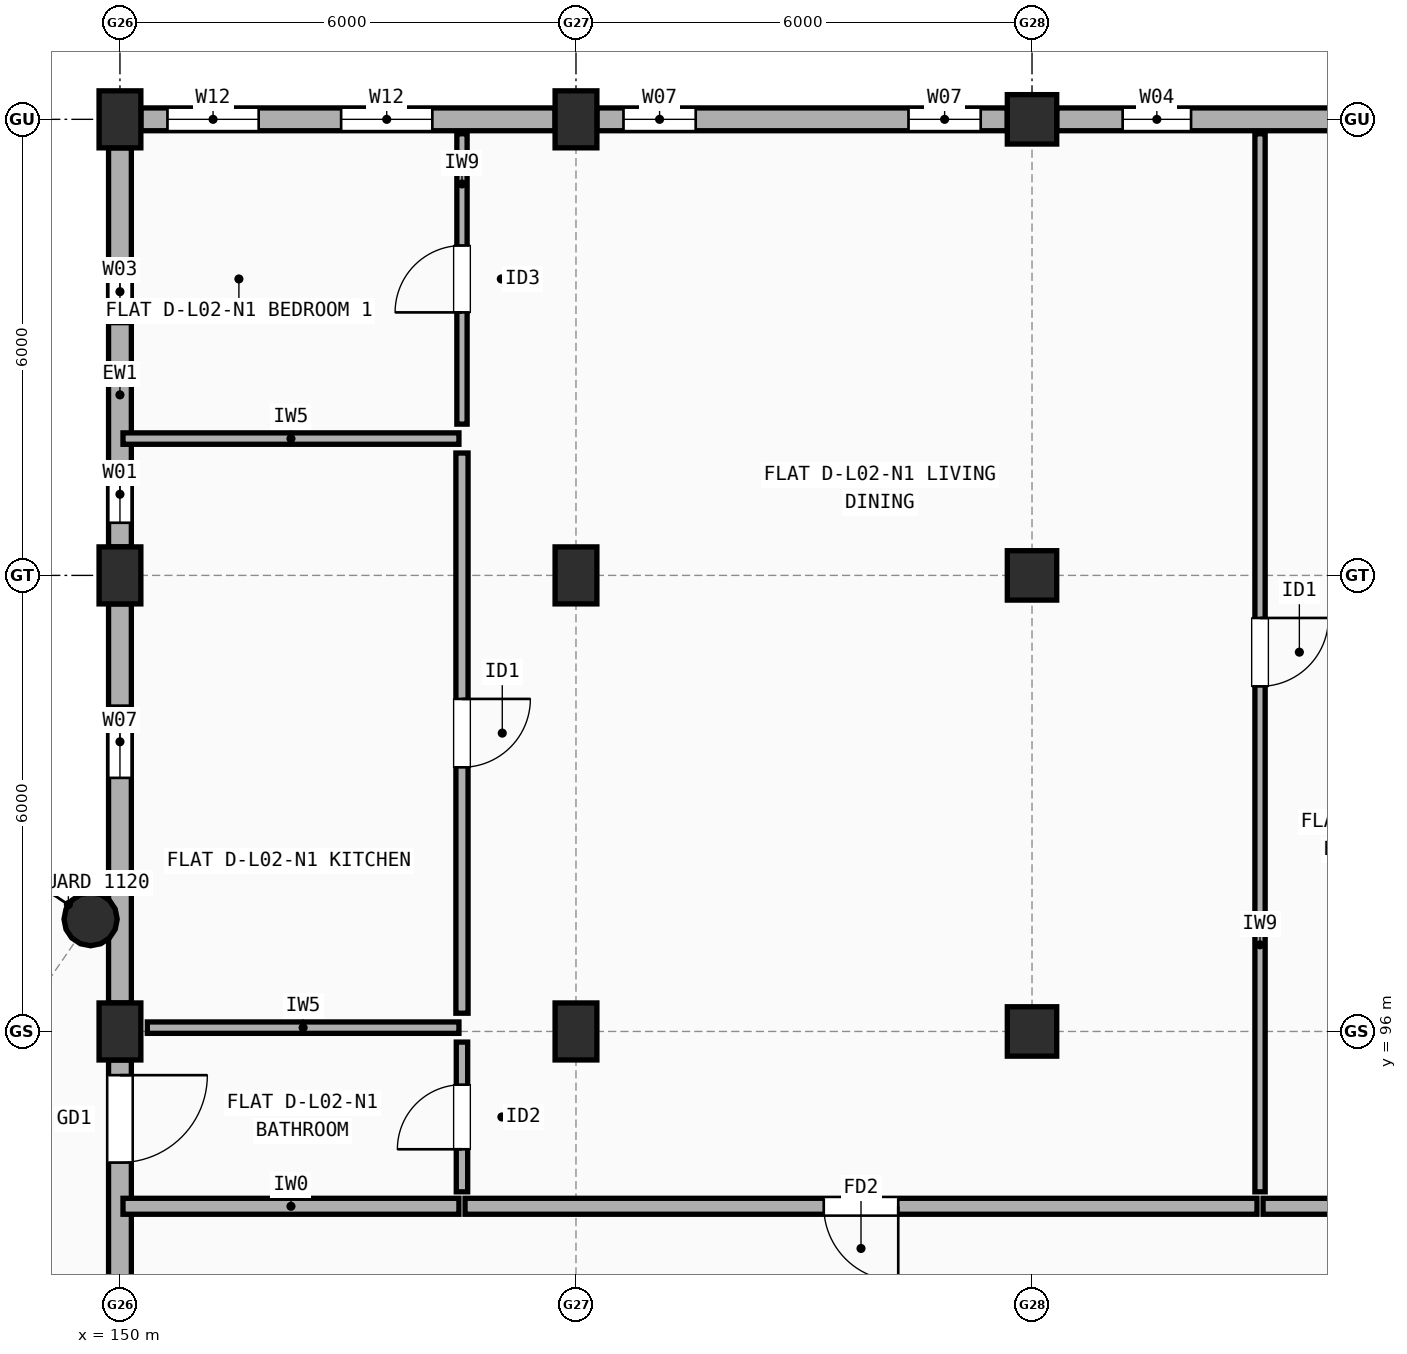
"""IFC4 building model, lengths in metres.
Left out: names, types, materials, properties, quantities, classifications, styles, units other than length and angle.
Written with IfcOpenShell. Run it as: python <this file> out.ifc"""

import sys

from ifc_helpers import new_model, si_unit, direction, frame, frame_2d, origin, origin_2d, place, context, subcontext, project, spatial, rectangle, circle, extrude, element, fill, save


model = new_model("IFC4")
c1 = context("Model", 3, precision=1e-05, world=origin(), true_north=direction((0.0, 1.0)))
c2 = subcontext(c1, "Body", "Model", "MODEL_VIEW")
j1 = project(units=[si_unit("LENGTHUNIT", "METRE"), si_unit("PLANEANGLEUNIT", "RADIAN")], contexts=[c1])
p1 = place(None, origin())
s1 = spatial("IfcSite", under=j1, at=p1, CompositionType="ELEMENT")
p2 = place(p1, origin())
s2 = spatial("IfcBuilding", under=s1, at=p2, CompositionType="ELEMENT")
p3 = place(p2, frame((0.0, 0.0, 7.7)))
s3 = spatial("IfcBuildingStorey", under=s2, at=p3, CompositionType="ELEMENT", Elevation=7.7)
for number, where, z_axis, x_axis in (
    (1, (150.0, 96.0, 0.0), (0.0, 0.0, 1.0), (1.0, 0.0, 0.0)),
    (2, (150.0, 102.0, 0.0), (0.0, 0.0, 1.0), (1.0, 0.0, 0.0)),
    (3, (150.0, 108.0, 0.0), (0.0, 0.0, 1.0), (1.0, 0.0, 0.0)),
    (4, (156.0, 96.0, 0.0), (0.0, 0.0, 1.0), (1.0, 0.0, 0.0)),
    (5, (156.0, 102.0, 0.0), (0.0, 0.0, 1.0), (1.0, 0.0, 0.0)),
    (6, (156.0, 108.0, 0.0), (0.0, 0.0, 1.0), (1.0, 0.0, 0.0)),
):
    element("IfcColumn", number, at=place(p3, frame(where, z_axis=z_axis, x_axis=x_axis)), inside=s3, PredefinedType="COLUMN", context=c2, shape_type="SweptSolid", body=[
        extrude(rectangle(XDim=0.55, YDim=0.75, at=origin_2d()), origin(), (0.0, 0.0, 1.0), 2.955),
    ])
for number, where, z_axis, x_axis in (
    (7, (162.0, 96.0, 0.0), (0.0, 0.0, 1.0), (1.0, 0.0, 0.0)),
    (8, (162.0, 102.0, 0.0), (0.0, 0.0, 1.0), (1.0, 0.0, 0.0)),
    (9, (162.0, 108.0, 0.0), (0.0, 0.0, 1.0), (1.0, 0.0, 0.0)),
):
    element("IfcColumn", number, at=place(p3, frame(where, z_axis=z_axis, x_axis=x_axis)), inside=s3, PredefinedType="COLUMN", context=c2, shape_type="SweptSolid", body=[
        extrude(rectangle(XDim=0.65, YDim=0.65, at=origin_2d()), origin(), (0.0, 0.0, 1.0), 2.955),
    ])
p4 = place(p3, frame((149.614, 97.477, 0.0), z_axis=(0.0, 0.0, 1.0), x_axis=(1.0, 0.0, 0.0)))
e10 = element("IfcColumn", 10, at=p4, inside=s3, PredefinedType="COLUMN", context=c2, shape_type="SweptSolid", body=[
    extrude(circle(Radius=0.35, at=origin_2d()), origin(), (0.0, 0.0, 1.0), 2.948),
])
p5 = place(p3, frame((167.675, 108.0, 0.0), z_axis=(0.0, 0.0, 1.0), x_axis=(-1.0, 0.0, 0.0)))
e11 = element("IfcWall", 11, at=p5, inside=s3, PredefinedType="STANDARD", context=c2, shape_type="SweptSolid", body=[
    extrude(rectangle(XDim=5.35, YDim=0.3, at=frame_2d((2.675, 0.0))), origin(), (0.0, 0.0, 1.0), 2.437),
])
p6 = place(p5, frame((0.893, 0.0, 0.9)))
e12 = element("IfcOpeningElement", 12, at=p6, cuts=e11, PredefinedType="OPENING", context=c2, shape_type="SweptSolid", body=[
    extrude(rectangle(XDim=0.85, YDim=1.25, at=frame_2d((0.425, 0.625))), frame((0.0, 0.16, 0.0), z_axis=(0.0, -1.0, 0.0), x_axis=(1.0, 0.0, 0.0)), (0.0, 0.0, 1.0), 0.32),
])
p7 = place(p5, frame((3.583, 0.0, 0.9)))
e13 = element("IfcOpeningElement", 13, at=p7, cuts=e11, PredefinedType="OPENING", context=c2, shape_type="SweptSolid", body=[
    extrude(rectangle(XDim=0.9, YDim=1.3, at=frame_2d((0.45, 0.65))), frame((0.0, 0.16, 0.0), z_axis=(0.0, -1.0, 0.0), x_axis=(1.0, 0.0, 0.0)), (0.0, 0.0, 1.0), 0.32),
])
p8 = place(p3, frame((161.675, 108.0, 0.0), z_axis=(0.0, 0.0, 1.0), x_axis=(-1.0, 0.0, 0.0)))
e14 = element("IfcWall", 14, at=p8, inside=s3, PredefinedType="STANDARD", context=c2, shape_type="SweptSolid", body=[
    extrude(rectangle(XDim=5.4, YDim=0.3, at=frame_2d((2.7, 0.0))), origin(), (0.0, 0.0, 1.0), 2.437),
])
p9 = place(p8, frame((0.35, 0.0, 0.9)))
e15 = element("IfcOpeningElement", 15, at=p9, cuts=e14, PredefinedType="OPENING", context=c2, shape_type="SweptSolid", body=[
    extrude(rectangle(XDim=0.95, YDim=1.35, at=frame_2d((0.475, 0.675))), frame((0.0, 0.16, 0.0), z_axis=(0.0, -1.0, 0.0), x_axis=(1.0, 0.0, 0.0)), (0.0, 0.0, 1.0), 0.32),
])
p10 = place(p8, frame((4.1, 0.0, 0.9)))
e16 = element("IfcOpeningElement", 16, at=p10, cuts=e14, PredefinedType="OPENING", context=c2, shape_type="SweptSolid", body=[
    extrude(rectangle(XDim=0.95, YDim=1.35, at=frame_2d((0.475, 0.675))), frame((0.0, 0.16, 0.0), z_axis=(0.0, -1.0, 0.0), x_axis=(1.0, 0.0, 0.0)), (0.0, 0.0, 1.0), 0.32),
])
p11 = place(p3, frame((155.725, 108.0, 0.0), z_axis=(0.0, 0.0, 1.0), x_axis=(-1.0, 0.0, 0.0)))
e17 = element("IfcWall", 17, at=p11, inside=s3, PredefinedType="STANDARD", context=c2, shape_type="SweptSolid", body=[
    extrude(rectangle(XDim=5.45, YDim=0.3, at=frame_2d((2.725, 0.0))), origin(), (0.0, 0.0, 1.0), 2.437),
])
p12 = place(p11, frame((1.615, 0.0, 0.9)))
e18 = element("IfcOpeningElement", 18, at=p12, cuts=e17, PredefinedType="OPENING", context=c2, shape_type="SweptSolid", body=[
    extrude(rectangle(XDim=1.2, YDim=1.35, at=frame_2d((0.6, 0.675))), frame((0.0, 0.16, 0.0), z_axis=(0.0, -1.0, 0.0), x_axis=(1.0, 0.0, 0.0)), (0.0, 0.0, 1.0), 0.32),
])
p13 = place(p11, frame((3.9, 0.0, 0.9)))
e19 = element("IfcOpeningElement", 19, at=p13, cuts=e17, PredefinedType="OPENING", context=c2, shape_type="SweptSolid", body=[
    extrude(rectangle(XDim=1.2, YDim=1.35, at=frame_2d((0.6, 0.675))), frame((0.0, 0.16, 0.0), z_axis=(0.0, -1.0, 0.0), x_axis=(1.0, 0.0, 0.0)), (0.0, 0.0, 1.0), 0.32),
])
p14 = place(p3, frame((150.0, 107.625, 0.0), z_axis=(0.0, 0.0, 1.0), x_axis=(0.0, -1.0, 0.0)))
e20 = element("IfcWall", 20, at=p14, inside=s3, PredefinedType="STANDARD", context=c2, shape_type="SweptSolid", body=[
    extrude(rectangle(XDim=5.25, YDim=0.3, at=frame_2d((2.625, 0.0))), origin(), (0.0, 0.0, 1.0), 2.437),
])
p15 = place(p14, frame((1.468, 0.0, 0.9)))
e21 = element("IfcOpeningElement", 21, at=p15, cuts=e20, PredefinedType="OPENING", context=c2, shape_type="SweptSolid", body=[
    extrude(rectangle(XDim=0.85, YDim=1.25, at=frame_2d((0.425, 0.625))), frame((0.0, 0.16, 0.0), z_axis=(0.0, -1.0, 0.0), x_axis=(1.0, 0.0, 0.0)), (0.0, 0.0, 1.0), 0.32),
])
p16 = place(p14, frame((4.183, 0.0, 0.9)))
e22 = element("IfcOpeningElement", 22, at=p16, cuts=e20, PredefinedType="OPENING", context=c2, shape_type="SweptSolid", body=[
    extrude(rectangle(XDim=0.75, YDim=1.15, at=frame_2d((0.375, 0.575))), frame((0.0, 0.16, 0.0), z_axis=(0.0, -1.0, 0.0), x_axis=(1.0, 0.0, 0.0)), (0.0, 0.0, 1.0), 0.32),
])
p17 = place(p3, frame((150.0, 101.625, 0.0), z_axis=(0.0, 0.0, 1.0), x_axis=(0.0, -1.0, 0.0)))
e23 = element("IfcWall", 23, at=p17, inside=s3, PredefinedType="STANDARD", context=c2, shape_type="SweptSolid", body=[
    extrude(rectangle(XDim=5.25, YDim=0.3, at=frame_2d((2.625, 0.0))), origin(), (0.0, 0.0, 1.0), 2.437),
])
p18 = place(p17, frame((1.339, 0.0, 0.9)))
e24 = element("IfcOpeningElement", 24, at=p18, cuts=e23, PredefinedType="OPENING", context=c2, shape_type="SweptSolid", body=[
    extrude(rectangle(XDim=0.95, YDim=1.35, at=frame_2d((0.475, 0.675))), frame((0.0, 0.16, 0.0), z_axis=(0.0, -1.0, 0.0), x_axis=(1.0, 0.0, 0.0)), (0.0, 0.0, 1.0), 0.32),
])
p19 = place(p3, frame((150.0, 95.625, 0.0), z_axis=(0.0, 0.0, 1.0), x_axis=(0.0, -1.0, 0.0)))
e25 = element("IfcWall", 25, at=p19, inside=s3, PredefinedType="STANDARD", context=c2, shape_type="SweptSolid", body=[
    extrude(rectangle(XDim=5.25, YDim=0.3, at=frame_2d((2.625, 0.0))), origin(), (0.0, 0.0, 1.0), 2.437),
])
p20 = place(p19, frame((0.2, 0.0, 0.0)))
e26 = element("IfcOpeningElement", 26, at=p20, cuts=e25, PredefinedType="OPENING", context=c2, shape_type="SweptSolid", body=[
    extrude(rectangle(XDim=1.15, YDim=2.15, at=frame_2d((0.575, 1.075))), frame((0.0, 0.16, 0.0), z_axis=(0.0, -1.0, 0.0), x_axis=(1.0, 0.0, 0.0)), (0.0, 0.0, 1.0), 0.32),
])
p21 = place(p19, frame((3.083, 0.0, 0.9)))
e27 = element("IfcOpeningElement", 27, at=p21, cuts=e25, PredefinedType="OPENING", context=c2, shape_type="SweptSolid", body=[
    extrude(rectangle(XDim=1.05, YDim=1.35, at=frame_2d((0.525, 0.675))), frame((0.0, 0.16, 0.0), z_axis=(0.0, -1.0, 0.0), x_axis=(1.0, 0.0, 0.0)), (0.0, 0.0, 1.0), 0.32),
])
p22 = place(p3, frame((150.04, 93.7, 0.0), z_axis=(0.0, 0.0, 1.0), x_axis=(1.0, 0.0, 0.0)))
e28 = element("IfcWall", 28, at=p22, inside=s3, PredefinedType="SOLIDWALL", context=c2, shape_type="SweptSolid", body=[
    extrude(rectangle(XDim=4.42, YDim=0.21, at=frame_2d((2.21, 0.0))), origin(), (0.0, 0.0, 1.0), 2.437),
])
p23 = place(p3, frame((154.54, 93.7, 0.0), z_axis=(0.0, 0.0, 1.0), x_axis=(1.0, 0.0, 0.0)))
e29 = element("IfcWall", 29, at=p23, inside=s3, PredefinedType="SOLIDWALL", context=c2, shape_type="SweptSolid", body=[
    extrude(rectangle(XDim=10.42, YDim=0.21, at=frame_2d((5.21, 0.0))), origin(), (0.0, 0.0, 1.0), 2.437),
])
p24 = place(p23, frame((4.72, 0.0, 0.0)))
e30 = element("IfcOpeningElement", 30, at=p24, cuts=e29, PredefinedType="OPENING", context=c2, shape_type="SweptSolid", body=[
    extrude(rectangle(XDim=0.98, YDim=2.15, at=frame_2d((0.49, 1.075))), frame((0.0, 0.115, 0.0), z_axis=(0.0, -1.0, 0.0), x_axis=(1.0, 0.0, 0.0)), (0.0, 0.0, 1.0), 0.23),
])
p25 = place(p3, frame((154.5, 103.99, 0.0), z_axis=(0.0, 0.0, 1.0), x_axis=(0.0, 1.0, 0.0)))
e31 = element("IfcWall", 31, at=p25, inside=s3, PredefinedType="PARTITIONING", context=c2, shape_type="SweptSolid", body=[
    extrude(rectangle(XDim=3.82, YDim=0.135, at=frame_2d((1.91, 0.0))), origin(), (0.0, 0.0, 1.0), 2.955),
])
p26 = place(p25, frame((1.47, 0.0, 0.0)))
e32 = element("IfcOpeningElement", 32, at=p26, cuts=e31, PredefinedType="OPENING", context=c2, shape_type="SweptSolid", body=[
    extrude(rectangle(XDim=0.88, YDim=2.1, at=frame_2d((0.44, 1.05))), frame((0.0, 0.077, 0.0), z_axis=(0.0, -1.0, 0.0), x_axis=(1.0, 0.0, 0.0)), (0.0, 0.0, 1.0), 0.155),
])
p27 = place(p3, frame((154.5, 96.24, 0.0), z_axis=(0.0, 0.0, 1.0), x_axis=(0.0, 1.0, 0.0)))
e33 = element("IfcWall", 33, at=p27, inside=s3, PredefinedType="PLUMBINGWALL", context=c2, shape_type="SweptSolid", body=[
    extrude(rectangle(XDim=7.37, YDim=0.16, at=frame_2d((3.685, 0.0))), origin(), (0.0, 0.0, 1.0), 2.437),
])
p28 = place(p27, frame((3.235, 0.0, 0.0)))
e34 = element("IfcOpeningElement", 34, at=p28, cuts=e33, PredefinedType="OPENING", context=c2, shape_type="SweptSolid", body=[
    extrude(rectangle(XDim=0.9, YDim=2.1, at=frame_2d((0.45, 1.05))), frame((0.0, 0.09, 0.0), z_axis=(0.0, -1.0, 0.0), x_axis=(1.0, 0.0, 0.0)), (0.0, 0.0, 1.0), 0.18),
])
p29 = place(p3, frame((154.5, 93.89, 0.0), z_axis=(0.0, 0.0, 1.0), x_axis=(0.0, 1.0, 0.0)))
e35 = element("IfcWall", 35, at=p29, inside=s3, PredefinedType="PARTITIONING", context=c2, shape_type="SweptSolid", body=[
    extrude(rectangle(XDim=1.97, YDim=0.15, at=frame_2d((0.985, 0.0))), origin(), (0.0, 0.0, 1.0), 2.955),
])
p30 = place(p29, frame((0.56, 0.0, 0.0)))
e36 = element("IfcOpeningElement", 36, at=p30, cuts=e35, PredefinedType="OPENING", context=c2, shape_type="SweptSolid", body=[
    extrude(rectangle(XDim=0.85, YDim=2.1, at=frame_2d((0.425, 1.05))), frame((0.0, 0.085, 0.0), z_axis=(0.0, -1.0, 0.0), x_axis=(1.0, 0.0, 0.0)), (0.0, 0.0, 1.0), 0.17),
])
p31 = place(p3, frame((150.04, 103.8, 0.0), z_axis=(0.0, 0.0, 1.0), x_axis=(1.0, 0.0, 0.0)))
e37 = element("IfcWall", 37, at=p31, inside=s3, PredefinedType="PARTITIONING", context=c2, shape_type="SweptSolid", body=[
    extrude(rectangle(XDim=4.42, YDim=0.15, at=frame_2d((2.21, 0.0))), origin(), (0.0, 0.0, 1.0), 2.437),
])
p32 = place(p3, frame((150.36, 96.05, 0.0), z_axis=(0.0, 0.0, 1.0), x_axis=(1.0, 0.0, 0.0)))
e38 = element("IfcWall", 38, at=p32, inside=s3, PredefinedType="PARTITIONING", context=c2, shape_type="SweptSolid", body=[
    extrude(rectangle(XDim=4.1, YDim=0.15, at=frame_2d((2.05, 0.0))), origin(), (0.0, 0.0, 1.0), 2.387),
])
p33 = place(p3, frame((165.04, 93.7, 0.0), z_axis=(0.0, 0.0, 1.0), x_axis=(1.0, 0.0, 0.0)))
e39 = element("IfcWall", 39, at=p33, inside=s3, PredefinedType="SOLIDWALL", context=c2, shape_type="SweptSolid", body=[
    extrude(rectangle(XDim=2.92, YDim=0.21, at=frame_2d((1.46, 0.0))), origin(), (0.0, 0.0, 1.0), 2.508),
])
p34 = place(p3, frame((165.0, 93.89, 0.0), z_axis=(0.0, 0.0, 1.0), x_axis=(0.0, 1.0, 0.0)))
e40 = element("IfcWall", 40, at=p34, inside=s3, PredefinedType="PARTITIONING", context=c2, shape_type="SweptSolid", body=[
    extrude(rectangle(XDim=13.92, YDim=0.135, at=frame_2d((6.96, 0.0))), origin(), (0.0, 0.0, 1.0), 2.387),
])
p35 = place(p34, frame((6.65, 0.0, 0.0)))
e41 = element("IfcOpeningElement", 41, at=p35, cuts=e40, PredefinedType="OPENING", context=c2, shape_type="SweptSolid", body=[
    extrude(rectangle(XDim=0.9, YDim=2.1, at=frame_2d((0.45, 1.05))), frame((0.0, 0.077, 0.0), z_axis=(0.0, -1.0, 0.0), x_axis=(1.0, 0.0, 0.0)), (0.0, 0.0, 1.0), 0.155),
])
p36 = place(p7, origin())
e42 = element("IfcWindow", 42, at=p36, inside=s3, PartitioningType="SINGLE_PANEL", PredefinedType="WINDOW", context=c2, shape_type="SweptSolid", body=[
    extrude(rectangle(XDim=0.9, YDim=1.3, at=frame_2d((0.45, 0.65))), frame((0.0, 0.03, 0.0), z_axis=(0.0, -1.0, 0.0), x_axis=(1.0, 0.0, 0.0)), (0.0, 0.0, 1.0), 0.06),
])
fill(e13, e42)
p37 = place(p9, origin())
e43 = element("IfcWindow", 43, at=p37, inside=s3, PartitioningType="SINGLE_PANEL", PredefinedType="WINDOW", context=c2, shape_type="SweptSolid", body=[
    extrude(rectangle(XDim=0.95, YDim=1.35, at=frame_2d((0.475, 0.675))), frame((0.0, 0.03, 0.0), z_axis=(0.0, -1.0, 0.0), x_axis=(1.0, 0.0, 0.0)), (0.0, 0.0, 1.0), 0.06),
])
fill(e15, e43)
p38 = place(p10, origin())
e44 = element("IfcWindow", 44, at=p38, inside=s3, PartitioningType="SINGLE_PANEL", PredefinedType="WINDOW", context=c2, shape_type="SweptSolid", body=[
    extrude(rectangle(XDim=0.95, YDim=1.35, at=frame_2d((0.475, 0.675))), frame((0.0, 0.03, 0.0), z_axis=(0.0, -1.0, 0.0), x_axis=(1.0, 0.0, 0.0)), (0.0, 0.0, 1.0), 0.06),
])
fill(e16, e44)
p39 = place(p12, origin())
e45 = element("IfcWindow", 45, at=p39, inside=s3, PartitioningType="SINGLE_PANEL", PredefinedType="WINDOW", context=c2, shape_type="SweptSolid", body=[
    extrude(rectangle(XDim=1.2, YDim=1.35, at=frame_2d((0.6, 0.675))), frame((0.0, 0.03, 0.0), z_axis=(0.0, -1.0, 0.0), x_axis=(1.0, 0.0, 0.0)), (0.0, 0.0, 1.0), 0.06),
])
fill(e18, e45)
p40 = place(p13, origin())
e46 = element("IfcWindow", 46, at=p40, inside=s3, PartitioningType="SINGLE_PANEL", PredefinedType="WINDOW", context=c2, shape_type="SweptSolid", body=[
    extrude(rectangle(XDim=1.2, YDim=1.35, at=frame_2d((0.6, 0.675))), frame((0.0, 0.03, 0.0), z_axis=(0.0, -1.0, 0.0), x_axis=(1.0, 0.0, 0.0)), (0.0, 0.0, 1.0), 0.06),
])
fill(e19, e46)
p41 = place(p15, origin())
e47 = element("IfcWindow", 47, at=p41, inside=s3, PartitioningType="SINGLE_PANEL", PredefinedType="WINDOW", context=c2, shape_type="SweptSolid", body=[
    extrude(rectangle(XDim=0.85, YDim=1.25, at=frame_2d((0.425, 0.625))), frame((0.0, 0.03, 0.0), z_axis=(0.0, -1.0, 0.0), x_axis=(1.0, 0.0, 0.0)), (0.0, 0.0, 1.0), 0.06),
])
fill(e21, e47)
p42 = place(p16, origin())
e48 = element("IfcWindow", 48, at=p42, inside=s3, PartitioningType="SINGLE_PANEL", PredefinedType="WINDOW", context=c2, shape_type="SweptSolid", body=[
    extrude(rectangle(XDim=0.75, YDim=1.15, at=frame_2d((0.375, 0.575))), frame((0.0, 0.03, 0.0), z_axis=(0.0, -1.0, 0.0), x_axis=(1.0, 0.0, 0.0)), (0.0, 0.0, 1.0), 0.06),
])
fill(e22, e48)
p43 = place(p18, origin())
e49 = element("IfcWindow", 49, at=p43, inside=s3, PartitioningType="SINGLE_PANEL", PredefinedType="WINDOW", context=c2, shape_type="SweptSolid", body=[
    extrude(rectangle(XDim=0.95, YDim=1.35, at=frame_2d((0.475, 0.675))), frame((0.0, 0.03, 0.0), z_axis=(0.0, -1.0, 0.0), x_axis=(1.0, 0.0, 0.0)), (0.0, 0.0, 1.0), 0.06),
])
fill(e24, e49)
p44 = place(p20, frame((1.15, 0.0, 0.0), z_axis=(0.0, 0.0, 1.0), x_axis=(-1.0, 0.0, 0.0)))
e50 = element("IfcDoor", 50, at=p44, inside=s3, OperationType="SINGLE_SWING_LEFT", PredefinedType="DOOR", context=c2, shape_type="SweptSolid", body=[
    extrude(rectangle(XDim=1.15, YDim=2.15, at=frame_2d((0.575, 1.075))), frame((0.0, 0.025, 0.0), z_axis=(0.0, -1.0, 0.0), x_axis=(1.0, 0.0, 0.0)), (0.0, 0.0, 1.0), 0.05),
])
fill(e26, e50)
p45 = place(p24, origin())
e51 = element("IfcDoor", 51, at=p45, inside=s3, OperationType="SINGLE_SWING_RIGHT", PredefinedType="DOOR", context=c2, shape_type="SweptSolid", body=[
    extrude(rectangle(XDim=0.98, YDim=2.15, at=frame_2d((0.49, 1.075))), frame((0.0, 0.025, 0.0), z_axis=(0.0, -1.0, 0.0), x_axis=(1.0, 0.0, 0.0)), (0.0, 0.0, 1.0), 0.05),
])
fill(e30, e51)
p46 = place(p26, origin())
e52 = element("IfcDoor", 52, at=p46, inside=s3, OperationType="SINGLE_SWING_LEFT", PredefinedType="DOOR", context=c2, shape_type="SweptSolid", body=[
    extrude(rectangle(XDim=0.88, YDim=2.1, at=frame_2d((0.44, 1.05))), frame((0.0, 0.025, 0.0), z_axis=(0.0, -1.0, 0.0), x_axis=(1.0, 0.0, 0.0)), (0.0, 0.0, 1.0), 0.05),
])
fill(e32, e52)
p47 = place(p28, origin())
e53 = element("IfcDoor", 53, at=p47, inside=s3, OperationType="SINGLE_SWING_RIGHT", PredefinedType="DOOR", context=c2, shape_type="SweptSolid", body=[
    extrude(rectangle(XDim=0.9, YDim=2.1, at=frame_2d((0.45, 1.05))), frame((0.0, 0.025, 0.0), z_axis=(0.0, -1.0, 0.0), x_axis=(1.0, 0.0, 0.0)), (0.0, 0.0, 1.0), 0.05),
])
fill(e34, e53)
p48 = place(p30, origin())
e54 = element("IfcDoor", 54, at=p48, inside=s3, OperationType="SINGLE_SWING_LEFT", PredefinedType="DOOR", context=c2, shape_type="SweptSolid", body=[
    extrude(rectangle(XDim=0.85, YDim=2.1, at=frame_2d((0.425, 1.05))), frame((0.0, 0.025, 0.0), z_axis=(0.0, -1.0, 0.0), x_axis=(1.0, 0.0, 0.0)), (0.0, 0.0, 1.0), 0.05),
])
fill(e36, e54)
p49 = place(p35, origin())
e55 = element("IfcDoor", 55, at=p49, inside=s3, OperationType="SINGLE_SWING_RIGHT", PredefinedType="DOOR", context=c2, shape_type="SweptSolid", body=[
    extrude(rectangle(XDim=0.9, YDim=2.1, at=frame_2d((0.45, 1.05))), frame((0.0, 0.025, 0.0), z_axis=(0.0, -1.0, 0.0), x_axis=(1.0, 0.0, 0.0)), (0.0, 0.0, 1.0), 0.05),
])
fill(e41, e55)
save(model, sys.argv[1])
